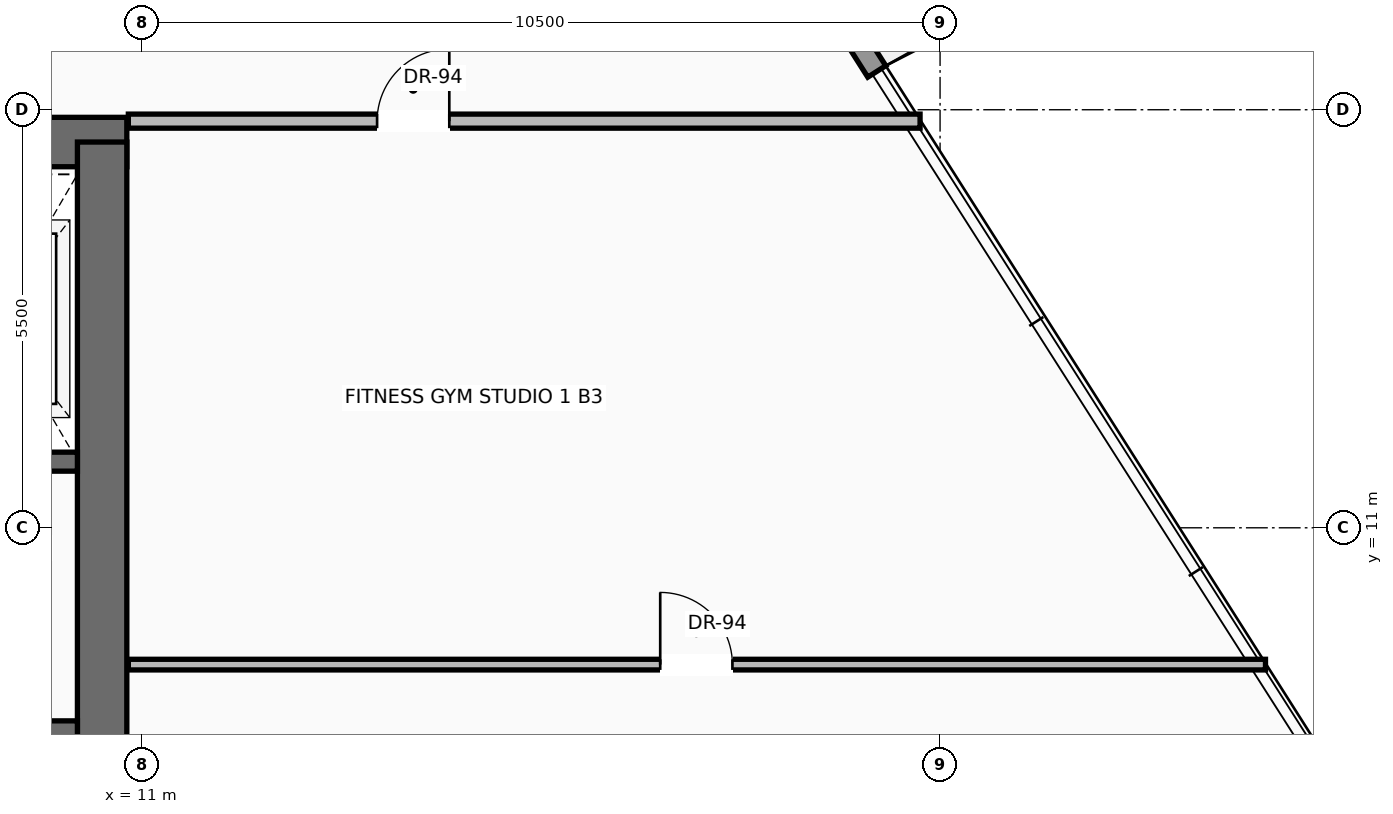
"""IFC4 building model, lengths in metres.
Left out: names, types, materials, properties, quantities, classifications, styles, units other than length and angle.
Written with IfcOpenShell. Run it as: python <this file> out.ifc"""

import sys

from ifc_helpers import new_model, si_unit, direction, frame, frame_2d, origin, place, context, subcontext, project, spatial, rectangle, extrude, source, transform, mapped, element, fill, save


model = new_model("IFC4")
c1 = context("Model", 3, precision=1e-05, world=origin(), true_north=direction((0.0, 1.0)))
c2 = subcontext(c1, "Body", "Model", "MODEL_VIEW")
j1 = project(units=[si_unit("LENGTHUNIT", "METRE"), si_unit("PLANEANGLEUNIT", "RADIAN")], contexts=[c1])
p1 = place(None, origin())
s1 = spatial("IfcSite", under=j1, at=p1, CompositionType="ELEMENT")
p2 = place(p1, origin())
s2 = spatial("IfcBuilding", under=s1, at=p2, CompositionType="ELEMENT")
p3 = place(p2, frame((0.0, 0.0, 158.9)))
s3 = spatial("IfcBuildingStorey", under=s2, at=p3, CompositionType="ELEMENT", Elevation=158.9)
p4 = place(p3, frame((-10.8, 16.075, 0.0), z_axis=(0.0, 0.0, 1.0), x_axis=(1.0, 0.0, 0.0)))
e1 = element("IfcWall", 1, at=p4, inside=s3, PredefinedType="SHEAR", context=c2, shape_type="SweptSolid", body=[
    extrude(rectangle(XDim=21.6, YDim=0.65, at=frame_2d((10.8, 0.0))), origin(), (0.0, 0.0, 1.0), 3.47),
])
p5 = place(p4, frame((3.37, 0.0, 0.0)))
e2 = element("IfcOpeningElement", 2, at=p5, cuts=e1, PredefinedType="OPENING", context=c2, shape_type="SweptSolid", body=[
    extrude(rectangle(XDim=1.3, YDim=2.3, at=frame_2d((0.65, 1.15))), frame((0.0, 0.335, 0.0), z_axis=(0.0, -1.0, 0.0), x_axis=(1.0, 0.0, 0.0)), (0.0, 0.0, 1.0), 0.67),
])
p6 = place(p4, frame((9.8, 0.0, 0.0)))
e3 = element("IfcOpeningElement", 3, at=p6, cuts=e1, PredefinedType="OPENING", context=c2, shape_type="SweptSolid", body=[
    extrude(rectangle(XDim=2.0, YDim=2.4, at=frame_2d((1.0, 1.2))), frame((0.0, 0.335, 0.0), z_axis=(0.0, -1.0, 0.0), x_axis=(1.0, 0.0, 0.0)), (0.0, 0.0, 1.0), 0.67),
])
p7 = place(p3, frame((10.475, 0.525, 0.0), z_axis=(0.0, 0.0, 1.0), x_axis=(0.0, 1.0, 0.0)))
e4 = element("IfcWall", 4, at=p7, inside=s3, PredefinedType="SHEAR", context=c2, shape_type="SweptSolid", body=[
    extrude(rectangle(XDim=15.55, YDim=0.65, at=frame_2d((7.775, 0.0))), origin(), (0.0, 0.0, 1.0), 3.47),
])
p8 = place(p3, frame((10.773, 32.569, 0.0), z_axis=(0.0, 0.0, 1.0), x_axis=(0.536444584594, -0.8439355471, 0.0)))
e5 = element("IfcWall", 5, at=p8, inside=s3, PredefinedType="SOLIDWALL", context=c2, shape_type="SweptSolid", body=[
    extrude(rectangle(XDim=18.443, YDim=0.28, at=frame_2d((9.222, 0.0))), origin(), (0.0, 0.0, 1.0), 3.05),
])
p9 = place(p8, frame((4.427, 0.0, 0.0)))
e6 = element("IfcOpeningElement", 6, at=p9, cuts=e5, PredefinedType="OPENING", context=c2, shape_type="SweptSolid", body=[
    extrude(rectangle(XDim=1.6, YDim=2.35, at=frame_2d((0.8, 1.175))), frame((0.0, 0.15, 0.0), z_axis=(0.0, -1.0, 0.0), x_axis=(1.0, 0.0, 0.0)), (0.0, 0.0, 1.0), 0.3),
])
p10 = place(p8, frame((12.542, 0.0, 0.9)))
e7 = element("IfcOpeningElement", 7, at=p10, cuts=e5, PredefinedType="OPENING", context=c2, shape_type="SweptSolid", body=[
    extrude(rectangle(XDim=2.0, YDim=1.85, at=frame_2d((1.0, 0.925))), frame((0.0, 0.15, 0.0), z_axis=(0.0, -1.0, 0.0), x_axis=(1.0, 0.0, 0.0)), (0.0, 0.0, 1.0), 0.3),
])
p11 = place(p3, frame((10.15, 8.35, 0.0), z_axis=(0.0, 0.0, 1.0), x_axis=(-1.0, 0.0, 0.0)))
e8 = element("IfcWall", 8, at=p11, inside=s3, PredefinedType="SOLIDWALL", context=c2, shape_type="SweptSolid", body=[
    extrude(rectangle(XDim=4.65, YDim=0.22, at=frame_2d((2.325, 0.0))), origin(), (0.0, 0.0, 1.0), 3.47),
])
p12 = place(p11, frame((1.0, 0.0, 0.0)))
e9 = element("IfcOpeningElement", 9, at=p12, cuts=e8, PredefinedType="OPENING", context=c2, shape_type="SweptSolid", body=[
    extrude(rectangle(XDim=1.15, YDim=2.2, at=frame_2d((0.575, 1.1))), frame((0.0, 0.12, 0.0), z_axis=(0.0, -1.0, 0.0), x_axis=(1.0, 0.0, 0.0)), (0.0, 0.0, 1.0), 0.24),
])
p13 = place(p3, frame((10.15, 11.87, 0.0), z_axis=(0.0, 0.0, 1.0), x_axis=(-1.0, 0.0, 0.0)))
e10 = element("IfcWall", 10, at=p13, inside=s3, PredefinedType="SOLIDWALL", context=c2, shape_type="SweptSolid", body=[
    extrude(rectangle(XDim=4.65, YDim=0.25, at=frame_2d((2.325, 0.0))), origin(), (0.0, 0.0, 1.0), 3.47),
])
p14 = place(p13, frame((0.5, 0.0, 0.0)))
e11 = element("IfcOpeningElement", 11, at=p14, cuts=e10, PredefinedType="OPENING", context=c2, shape_type="SweptSolid", body=[
    extrude(rectangle(XDim=1.2, YDim=2.25, at=frame_2d((0.6, 1.125))), frame((0.0, 0.135, 0.0), z_axis=(0.0, -1.0, 0.0), x_axis=(1.0, 0.0, 0.0)), (0.0, 0.0, 1.0), 0.27),
])
p15 = place(p3, frame((10.82, 16.35, 0.0), z_axis=(0.0, 0.0, 1.0), x_axis=(1.0, 0.0, 0.0)))
e12 = element("IfcWall", 12, at=p15, inside=s3, PredefinedType="PARTITIONING", context=c2, shape_type="SweptSolid", body=[
    extrude(rectangle(XDim=10.417, YDim=0.185, at=frame_2d((5.208, 0.0))), origin(), (0.0, 0.0, 1.0), 3.462),
])
p16 = place(p15, frame((3.273, 0.0, 0.0)))
e13 = element("IfcOpeningElement", 13, at=p16, cuts=e12, PredefinedType="OPENING", context=c2, shape_type="SweptSolid", body=[
    extrude(rectangle(XDim=0.95, YDim=2.2, at=frame_2d((0.475, 1.1))), frame((0.0, 0.103, 0.0), z_axis=(0.0, -1.0, 0.0), x_axis=(1.0, 0.0, 0.0)), (0.0, 0.0, 1.0), 0.205),
])
p17 = place(p3, frame((10.82, 9.2, 0.0), z_axis=(0.0, 0.0, 1.0), x_axis=(1.0, 0.0, 0.0)))
e14 = element("IfcWall", 14, at=p17, inside=s3, PredefinedType="PARTITIONING", context=c2, shape_type="SweptSolid", body=[
    extrude(rectangle(XDim=14.961, YDim=0.14, at=frame_2d((7.481, 0.0))), origin(), (0.0, 0.0, 1.0), 3.462),
])
p18 = place(p17, frame((6.998, 0.0, 0.0)))
e15 = element("IfcOpeningElement", 15, at=p18, cuts=e14, PredefinedType="OPENING", context=c2, shape_type="SweptSolid", body=[
    extrude(rectangle(XDim=0.95, YDim=2.2, at=frame_2d((0.475, 1.1))), frame((0.0, 0.08, 0.0), z_axis=(0.0, -1.0, 0.0), x_axis=(1.0, 0.0, 0.0)), (0.0, 0.0, 1.0), 0.16),
])
m1 = source(origin(), c2, "Body", "SweptSolid", [
    extrude(rectangle(XDim=0.95, YDim=2.2, at=frame_2d((0.475, 1.1))), frame((0.0, 0.025, 0.0), z_axis=(0.0, -1.0, 0.0), x_axis=(1.0, 0.0, 0.0)), (0.0, 0.0, 1.0), 0.05),
])
p19 = place(p16, origin())
e16 = element("IfcDoor", 16, at=p19, inside=s3, OperationType="SINGLE_SWING_RIGHT", PredefinedType="DOOR", context=c2, shape_type="MappedRepresentation", body=[
    mapped(m1, transform((0.0, 0.0, 0.0), scale=1.0)),
])
fill(e13, e16)
p20 = place(p18, origin())
e17 = element("IfcDoor", 17, at=p20, inside=s3, OperationType="SINGLE_SWING_LEFT", PredefinedType="DOOR", context=c2, shape_type="MappedRepresentation", body=[
    mapped(m1, transform((0.0, 0.0, 0.0), scale=1.0)),
])
fill(e15, e17)
save(model, sys.argv[1])
